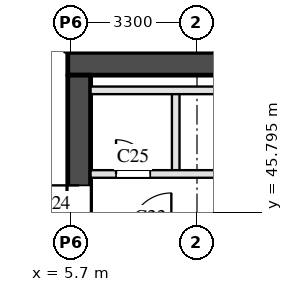
"""IFC4 building model, lengths in metres.
Left out: names, types, materials, properties, quantities, classifications, styles, units other than length and angle.
Written with IfcOpenShell. Run it as: python <this file> out.ifc"""

import sys

from ifc_helpers import new_model, si_unit, direction, frame, frame_2d, origin, place, context, subcontext, project, spatial, rectangle, extrude, element, fill, save


model = new_model("IFC4")
c1 = context("Model", 3, precision=1e-05, world=origin(), true_north=direction((0.0, 1.0)))
c2 = subcontext(c1, "Body", "Model", "MODEL_VIEW")
j1 = project(units=[si_unit("LENGTHUNIT", "METRE"), si_unit("PLANEANGLEUNIT", "RADIAN")], contexts=[c1])
p1 = place(None, origin())
s1 = spatial("IfcSite", under=j1, at=p1, CompositionType="ELEMENT")
p2 = place(p1, origin())
s2 = spatial("IfcBuilding", under=s1, at=p2, CompositionType="ELEMENT")
p3 = place(p2, frame((0.0, 0.0, 8.0)))
s3 = spatial("IfcBuildingStorey", under=s2, at=p3, CompositionType="ELEMENT", Elevation=8.0)
p4 = place(p3, frame((5.6, 49.7, 0.0), z_axis=(0.0, 0.0, 1.0), x_axis=(1.0, 0.0, 0.0)))
e1 = element("IfcWall", 1, at=p4, inside=s3, PredefinedType="SHEAR", context=c2, shape_type="SweptSolid", body=[
    extrude(rectangle(XDim=12.4, YDim=0.6, at=frame_2d((6.2, 0.0))), origin(), (0.0, 0.0, 1.0), 5.59),
])
p5 = place(p3, frame((5.9, 29.1, 0.0), z_axis=(0.0, 0.0, 1.0), x_axis=(0.0, 1.0, 0.0)))
e2 = element("IfcWall", 2, at=p5, inside=s3, PredefinedType="SHEAR", context=c2, shape_type="SweptSolid", body=[
    extrude(rectangle(XDim=20.3, YDim=0.6, at=frame_2d((10.15, 0.0))), origin(), (0.0, 0.0, 1.0), 5.59),
])
p6 = place(p5, frame((3.6, 0.0, 0.0)))
e3 = element("IfcOpeningElement", 3, at=p6, cuts=e2, PredefinedType="OPENING", context=c2, shape_type="SweptSolid", body=[
    extrude(rectangle(XDim=1.8, YDim=2.1, at=frame_2d((0.9, 1.05))), frame((0.0, 0.31, 0.0), z_axis=(0.0, -1.0, 0.0), x_axis=(1.0, 0.0, 0.0)), (0.0, 0.0, 1.0), 0.62),
])
p7 = place(p5, frame((16.4, 0.0, 0.0)))
e4 = element("IfcOpeningElement", 4, at=p7, cuts=e2, PredefinedType="OPENING", context=c2, shape_type="SweptSolid", body=[
    extrude(rectangle(XDim=1.0, YDim=2.1, at=frame_2d((0.5, 1.05))), frame((0.0, 0.31, 0.0), z_axis=(0.0, -1.0, 0.0), x_axis=(1.0, 0.0, 0.0)), (0.0, 0.0, 1.0), 0.62),
])
p8 = place(p3, frame((8.44, 46.8, 0.0), z_axis=(0.0, 0.0, 1.0), x_axis=(0.0, 1.0, 0.0)))
e5 = element("IfcWall", 5, at=p8, inside=s3, PredefinedType="PARTITIONING", context=c2, shape_type="SweptSolid", body=[
    extrude(rectangle(XDim=2.2, YDim=0.2, at=frame_2d((1.1, 0.0))), origin(), (0.0, 0.0, 1.0), 5.59),
])
p9 = place(p3, frame((6.2, 46.8, 0.0), z_axis=(0.0, 0.0, 1.0), x_axis=(1.0, 0.0, 0.0)))
e6 = element("IfcWall", 6, at=p9, inside=s3, PredefinedType="PARTITIONING", context=c2, shape_type="SweptSolid", body=[
    extrude(rectangle(XDim=11.2, YDim=0.2, at=frame_2d((5.6, 0.0))), origin(), (0.0, 0.0, 1.0), 5.59),
])
p10 = place(p9, frame((0.67, 0.0, 0.0)))
e7 = element("IfcOpeningElement", 7, at=p10, cuts=e6, PredefinedType="OPENING", context=c2, shape_type="SweptSolid", body=[
    extrude(rectangle(XDim=0.9, YDim=2.1, at=frame_2d((0.45, 1.05))), frame((0.0, 0.11, 0.0), z_axis=(0.0, -1.0, 0.0), x_axis=(1.0, 0.0, 0.0)), (0.0, 0.0, 1.0), 0.22),
])
p11 = place(p9, frame((6.27, 0.0, 0.0)))
e8 = element("IfcOpeningElement", 8, at=p11, cuts=e6, PredefinedType="OPENING", context=c2, shape_type="SweptSolid", body=[
    extrude(rectangle(XDim=0.9, YDim=2.1, at=frame_2d((0.45, 1.05))), frame((0.0, 0.11, 0.0), z_axis=(0.0, -1.0, 0.0), x_axis=(1.0, 0.0, 0.0)), (0.0, 0.0, 1.0), 0.22),
])
p12 = place(p3, frame((6.2, 49.0, 0.0), z_axis=(0.0, 0.0, 1.0), x_axis=(1.0, 0.0, 0.0)))
e9 = element("IfcWall", 9, at=p12, inside=s3, PredefinedType="PARTITIONING", context=c2, shape_type="SweptSolid", body=[
    extrude(rectangle(XDim=11.2, YDim=0.2, at=frame_2d((5.6, 0.0))), origin(), (0.0, 0.0, 1.0), 5.59),
])
p13 = place(p7, origin())
e10 = element("IfcDoor", 10, at=p13, inside=s3, OperationType="SINGLE_SWING_RIGHT", PredefinedType="DOOR", context=c2, shape_type="SweptSolid", body=[
    extrude(rectangle(XDim=1.0, YDim=2.1, at=frame_2d((0.5, 1.05))), frame((0.0, 0.025, 0.0), z_axis=(0.0, -1.0, 0.0), x_axis=(1.0, 0.0, 0.0)), (0.0, 0.0, 1.0), 0.05),
])
fill(e4, e10)
p14 = place(p10, origin())
e11 = element("IfcDoor", 11, at=p14, inside=s3, OperationType="SINGLE_SWING_LEFT", PredefinedType="DOOR", context=c2, shape_type="SweptSolid", body=[
    extrude(rectangle(XDim=0.9, YDim=2.1, at=frame_2d((0.45, 1.05))), frame((0.0, 0.025, 0.0), z_axis=(0.0, -1.0, 0.0), x_axis=(1.0, 0.0, 0.0)), (0.0, 0.0, 1.0), 0.05),
])
fill(e7, e11)
save(model, sys.argv[1])
